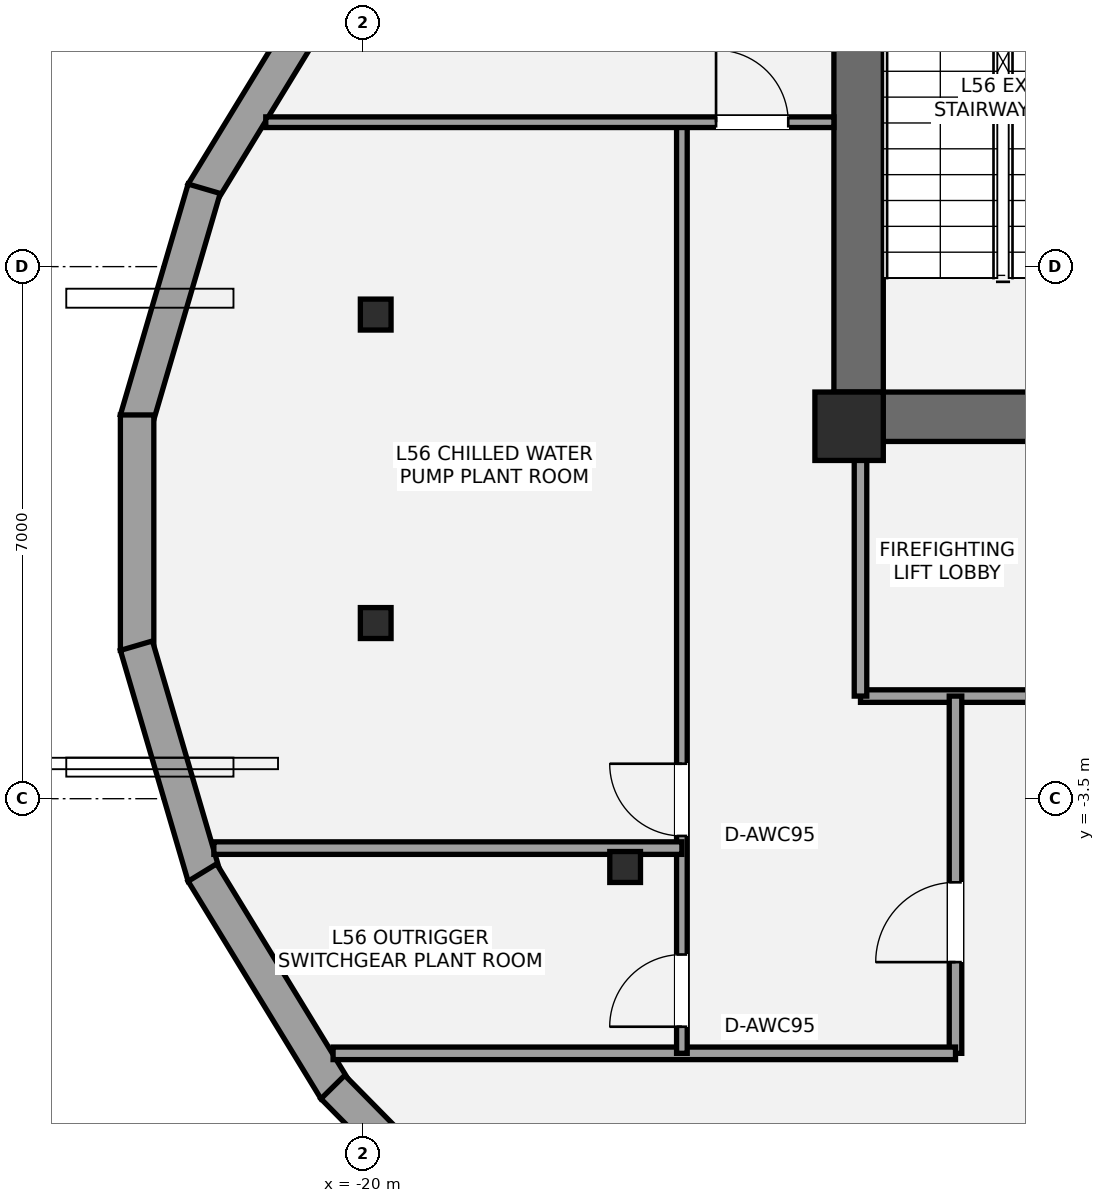
"""IFC4 building model, lengths in metres.
Left out: names, types, materials, properties, quantities, classifications, styles, units other than length and angle.
Written with IfcOpenShell. Run it as: python <this file> out.ifc"""

import sys

from ifc_helpers import new_model, si_unit, direction, frame, frame_2d, origin, origin_2d, place, context, subcontext, project, spatial, rectangle, i_section, extrude, element, fill, save


model = new_model("IFC4")
c1 = context("Model", 3, precision=1e-05, world=origin(), true_north=direction((0.0, 1.0)))
c2 = subcontext(c1, "Body", "Model", "MODEL_VIEW")
j1 = project(units=[si_unit("LENGTHUNIT", "METRE"), si_unit("PLANEANGLEUNIT", "RADIAN")], contexts=[c1])
p1 = place(None, origin())
s1 = spatial("IfcSite", under=j1, at=p1, CompositionType="ELEMENT")
p2 = place(p1, origin())
s2 = spatial("IfcBuilding", under=s1, at=p2, CompositionType="ELEMENT")
p3 = place(p2, frame((0.0, 0.0, 201.4)))
s3 = spatial("IfcBuildingStorey", under=s2, at=p3, CompositionType="ELEMENT", Elevation=201.4)
p4 = place(p3, frame((-13.475, 1.2, 0.0), z_axis=(0.0, 0.0, 1.0), x_axis=(0.0, 1.0, 0.0)))
e1 = element("IfcWall", 1, at=p4, inside=s3, PredefinedType="SHEAR", context=c2, shape_type="SweptSolid", body=[
    extrude(rectangle(XDim=8.45, YDim=0.65, at=frame_2d((4.225, 0.0))), origin(), (0.0, 0.0, 1.0), 4.5),
])
p5 = place(p3, frame((-4.875, 1.525, 0.0), z_axis=(0.0, 0.0, 1.0), x_axis=(-1.0, 0.0, 0.0)))
e2 = element("IfcWall", 2, at=p5, inside=s3, PredefinedType="SHEAR", context=c2, shape_type="SweptSolid", body=[
    extrude(rectangle(XDim=8.925, YDim=0.65, at=frame_2d((4.462, 0.0))), origin(), (0.0, 0.0, 1.0), 4.5),
])
p6 = place(p5, frame((5.305, 0.0, 0.0)))
e3 = element("IfcOpeningElement", 3, at=p6, cuts=e2, PredefinedType="OPENING", context=c2, shape_type="SweptSolid", body=[
    extrude(rectangle(XDim=1.05, YDim=2.15, at=frame_2d((0.525, 1.075))), frame((0.0, 0.335, 0.0), z_axis=(0.0, -1.0, 0.0), x_axis=(1.0, 0.0, 0.0)), (0.0, 0.0, 1.0), 0.67),
])
p7 = place(p5, frame((3.755, 0.0, 0.0)))
e4 = element("IfcOpeningElement", 4, at=p7, cuts=e2, PredefinedType="OPENING", context=c2, shape_type="SweptSolid", body=[
    extrude(rectangle(XDim=1.1, YDim=2.2, at=frame_2d((0.55, 1.1))), frame((0.0, 0.335, 0.0), z_axis=(0.0, -1.0, 0.0), x_axis=(1.0, 0.0, 0.0)), (0.0, 0.0, 1.0), 0.67),
])
p8 = place(p3, frame((-13.6, 1.4, 0.0), z_axis=(0.0, 0.0, 1.0), x_axis=(1.0, 0.0, 0.0)))
e5 = element("IfcColumn", 5, at=p8, inside=s3, PredefinedType="COLUMN", context=c2, shape_type="SweptSolid", body=[
    extrude(rectangle(XDim=0.9, YDim=0.9, at=origin_2d()), origin(), (0.0, 0.0, 1.0), 4.5),
])
for number, where, z_axis, x_axis in (
    (6, (-19.828, 2.869, 0.0), (0.0, 0.0, 1.0), (1.0, 0.0, 0.0)),
    (7, (-19.828, -1.189, 0.0), (0.0, 0.0, 1.0), (1.0, 0.0, 0.0)),
    (8, (-16.547, -4.398, 0.0), (0.0, 0.0, 1.0), (1.0, 0.0, 0.0)),
):
    element("IfcColumn", number, at=place(p3, frame(where, z_axis=z_axis, x_axis=x_axis)), inside=s3, PredefinedType="COLUMN", context=c2, shape_type="SweptSolid", body=[
        extrude(i_section(OverallWidth=0.404, OverallDepth=0.407, WebThickness=0.027, FlangeThickness=0.044, at=origin_2d()), origin(), (0.0, 0.0, 1.0), 4.5),
    ])
p9 = place(p3, frame((-22.109, 4.472, 0.0), z_axis=(0.0, 0.0, 1.0), x_axis=(0.521214394333, 0.853425775999, 0.0)))
e9 = element("IfcWall", 9, at=p9, inside=s3, PredefinedType="STANDARD", context=c2, shape_type="SweptSolid", body=[
    extrude(rectangle(XDim=3.353, YDim=0.44, at=frame_2d((1.677, 0.0))), origin(), (0.0, 0.0, 1.0), 3.575),
])
p10 = place(p3, frame((-22.977, 1.487, 0.0), z_axis=(0.0, 0.0, 1.0), x_axis=(0.281477355005, 0.959567870773, 0.0)))
e10 = element("IfcWall", 10, at=p10, inside=s3, PredefinedType="STANDARD", context=c2, shape_type="SweptSolid", body=[
    extrude(rectangle(XDim=3.166, YDim=0.44, at=frame_2d((1.583, 0.0))), origin(), (0.0, 0.0, 1.0), 3.575),
])
p11 = place(p3, frame((-22.968, -1.549, 0.0), z_axis=(0.0, 0.0, 1.0), x_axis=(0.0, 1.0, 0.0)))
e11 = element("IfcWall", 11, at=p11, inside=s3, PredefinedType="STANDARD", context=c2, shape_type="SweptSolid", body=[
    extrude(rectangle(XDim=3.097, YDim=0.44, at=frame_2d((1.549, 0.0))), origin(), (0.0, 0.0, 1.0), 3.575),
])
p12 = place(p3, frame((-22.086, -4.525, 0.0), z_axis=(0.0, 0.0, 1.0), x_axis=(-0.281477355005, 0.959567870773, 0.0)))
e12 = element("IfcWall", 12, at=p12, inside=s3, PredefinedType="STANDARD", context=c2, shape_type="SweptSolid", body=[
    extrude(rectangle(XDim=3.166, YDim=0.44, at=frame_2d((1.583, 0.0))), origin(), (0.0, 0.0, 1.0), 3.575),
])
p13 = place(p3, frame((-20.361, -7.333, 0.0), z_axis=(0.0, 0.0, 1.0), x_axis=(-0.521214394333, 0.853425775999, 0.0)))
e13 = element("IfcWall", 13, at=p13, inside=s3, PredefinedType="STANDARD", context=c2, shape_type="SweptSolid", body=[
    extrude(rectangle(XDim=3.353, YDim=0.44, at=frame_2d((1.677, 0.0))), origin(), (0.0, 0.0, 1.0), 3.575),
])
p14 = place(p3, frame((-17.854, -9.869, 0.0), z_axis=(0.0, 0.0, 1.0), x_axis=(-0.701887992659, 0.712287333708, 0.0)))
e14 = element("IfcWall", 14, at=p14, inside=s3, PredefinedType="STANDARD", context=c2, shape_type="SweptSolid", body=[
    extrude(rectangle(XDim=3.615, YDim=0.44, at=frame_2d((1.808, 0.0))), origin(), (0.0, 0.0, 1.0), 3.575),
])
p15 = place(p3, frame((-13.45, -2.15, 0.0), z_axis=(0.0, 0.0, 1.0), x_axis=(1.0, 0.0, 0.0)))
e15 = element("IfcWall", 15, at=p15, inside=s3, PredefinedType="PARTITIONING", context=c2, shape_type="SweptSolid", body=[
    extrude(rectangle(XDim=6.25, YDim=0.165, at=frame_2d((3.125, 0.0))), origin(), (0.0, 0.0, 1.0), 4.28),
])
p16 = place(p15, frame((2.6, 0.0, 0.0)))
e16 = element("IfcOpeningElement", 16, at=p16, cuts=e15, PredefinedType="OPENING", context=c2, shape_type="SweptSolid", body=[
    extrude(rectangle(XDim=1.05, YDim=2.15, at=frame_2d((0.525, 1.075))), frame((0.0, 0.093, 0.0), z_axis=(0.0, -1.0, 0.0), x_axis=(1.0, 0.0, 0.0)), (0.0, 0.0, 1.0), 0.185),
])
p17 = place(p3, frame((-13.45, -2.15, 0.0), z_axis=(0.0, 0.0, 1.0), x_axis=(0.0, 1.0, 0.0)))
e17 = element("IfcWall", 17, at=p17, inside=s3, PredefinedType="PARTITIONING", context=c2, shape_type="SweptSolid", body=[
    extrude(rectangle(XDim=3.4, YDim=0.165, at=frame_2d((1.7, 0.0))), origin(), (0.0, 0.0, 1.0), 2.47),
])
p18 = place(p3, frame((-12.2, -6.85, 0.0), z_axis=(0.0, 0.0, 1.0), x_axis=(0.0, 1.0, 0.0)))
e18 = element("IfcWall", 18, at=p18, inside=s3, PredefinedType="PARTITIONING", context=c2, shape_type="SweptSolid", body=[
    extrude(rectangle(XDim=4.7, YDim=0.165, at=frame_2d((2.35, 0.0))), origin(), (0.0, 0.0, 1.0), 3.733),
])
p19 = place(p18, frame((1.2, 0.0, 0.0)))
e19 = element("IfcOpeningElement", 19, at=p19, cuts=e18, PredefinedType="OPENING", context=c2, shape_type="SweptSolid", body=[
    extrude(rectangle(XDim=1.05, YDim=2.15, at=frame_2d((0.525, 1.075))), frame((0.0, 0.093, 0.0), z_axis=(0.0, -1.0, 0.0), x_axis=(1.0, 0.0, 0.0)), (0.0, 0.0, 1.0), 0.185),
])
p20 = place(p3, frame((-20.389, -6.85, 0.0), z_axis=(0.0, 0.0, 1.0), x_axis=(1.0, 0.0, 0.0)))
e20 = element("IfcWall", 20, at=p20, inside=s3, PredefinedType="PARTITIONING", context=c2, shape_type="SweptSolid", body=[
    extrude(rectangle(XDim=8.189, YDim=0.165, at=frame_2d((4.095, 0.0))), origin(), (0.0, 0.0, 1.0), 3.733),
])
p21 = place(p3, frame((-15.8, -6.85, 0.0), z_axis=(0.0, 0.0, 1.0), x_axis=(0.0, 1.0, 0.0)))
e21 = element("IfcWall", 21, at=p21, inside=s3, PredefinedType="PARTITIONING", context=c2, shape_type="SweptSolid", body=[
    extrude(rectangle(XDim=12.25, YDim=0.14, at=frame_2d((6.125, 0.0))), origin(), (0.0, 0.0, 1.0), 2.47),
])
p22 = place(p21, frame((0.35, 0.0, 0.0)))
e22 = element("IfcOpeningElement", 22, at=p22, cuts=e21, PredefinedType="OPENING", context=c2, shape_type="SweptSolid", body=[
    extrude(rectangle(XDim=0.95, YDim=2.15, at=frame_2d((0.475, 1.075))), frame((0.0, 0.08, 0.0), z_axis=(0.0, -1.0, 0.0), x_axis=(1.0, 0.0, 0.0)), (0.0, 0.0, 1.0), 0.16),
])
p23 = place(p21, frame((2.86, 0.0, 0.0)))
e23 = element("IfcOpeningElement", 23, at=p23, cuts=e21, PredefinedType="OPENING", context=c2, shape_type="SweptSolid", body=[
    extrude(rectangle(XDim=0.95, YDim=2.15, at=frame_2d((0.475, 1.075))), frame((0.0, 0.08, 0.0), z_axis=(0.0, -1.0, 0.0), x_axis=(1.0, 0.0, 0.0)), (0.0, 0.0, 1.0), 0.16),
])
p24 = place(p3, frame((-21.275, 5.4, 0.0), z_axis=(0.0, 0.0, 1.0), x_axis=(1.0, 0.0, 0.0)))
e24 = element("IfcWall", 24, at=p24, inside=s3, PredefinedType="PARTITIONING", context=c2, shape_type="SweptSolid", body=[
    extrude(rectangle(XDim=7.475, YDim=0.14, at=frame_2d((3.737, 0.0))), origin(), (0.0, 0.0, 1.0), 3.733),
])
p25 = place(p24, frame((5.924, 0.0, 0.0)))
e25 = element("IfcOpeningElement", 25, at=p25, cuts=e24, PredefinedType="OPENING", context=c2, shape_type="SweptSolid", body=[
    extrude(rectangle(XDim=0.95, YDim=2.15, at=frame_2d((0.475, 1.075))), frame((0.0, 0.08, 0.0), z_axis=(0.0, -1.0, 0.0), x_axis=(1.0, 0.0, 0.0)), (0.0, 0.0, 1.0), 0.16),
])
p26 = place(p3, frame((-21.958, -4.15, 0.0), z_axis=(0.0, 0.0, 1.0), x_axis=(1.0, 0.0, 0.0)))
e26 = element("IfcWall", 26, at=p26, inside=s3, PredefinedType="PARTITIONING", context=c2, shape_type="SweptSolid", body=[
    extrude(rectangle(XDim=6.158, YDim=0.165, at=frame_2d((3.079, 0.0))), origin(), (0.0, 0.0, 1.0), 2.47),
])
p27 = place(p19, origin())
e27 = element("IfcDoor", 27, at=p27, inside=s3, OperationType="SINGLE_SWING_LEFT", PredefinedType="DOOR", context=c2, shape_type="SweptSolid", body=[
    extrude(rectangle(XDim=1.05, YDim=2.15, at=frame_2d((0.525, 1.075))), frame((0.0, 0.025, 0.0), z_axis=(0.0, -1.0, 0.0), x_axis=(1.0, 0.0, 0.0)), (0.0, 0.0, 1.0), 0.05),
])
fill(e19, e27)
p28 = place(p22, origin())
e28 = element("IfcDoor", 28, at=p28, inside=s3, OperationType="SINGLE_SWING_LEFT", PredefinedType="DOOR", context=c2, shape_type="SweptSolid", body=[
    extrude(rectangle(XDim=0.95, YDim=2.15, at=frame_2d((0.475, 1.075))), frame((0.0, 0.025, 0.0), z_axis=(0.0, -1.0, 0.0), x_axis=(1.0, 0.0, 0.0)), (0.0, 0.0, 1.0), 0.05),
])
fill(e22, e28)
p29 = place(p23, origin())
e29 = element("IfcDoor", 29, at=p29, inside=s3, OperationType="SINGLE_SWING_RIGHT", PredefinedType="DOOR", context=c2, shape_type="SweptSolid", body=[
    extrude(rectangle(XDim=0.95, YDim=2.15, at=frame_2d((0.475, 1.075))), frame((0.0, 0.025, 0.0), z_axis=(0.0, -1.0, 0.0), x_axis=(1.0, 0.0, 0.0)), (0.0, 0.0, 1.0), 0.05),
])
fill(e23, e29)
p30 = place(p25, origin())
e30 = element("IfcDoor", 30, at=p30, inside=s3, OperationType="SINGLE_SWING_LEFT", PredefinedType="DOOR", context=c2, shape_type="SweptSolid", body=[
    extrude(rectangle(XDim=0.95, YDim=2.15, at=frame_2d((0.475, 1.075))), frame((0.0, 0.025, 0.0), z_axis=(0.0, -1.0, 0.0), x_axis=(1.0, 0.0, 0.0)), (0.0, 0.0, 1.0), 0.05),
])
fill(e25, e30)
save(model, sys.argv[1])
